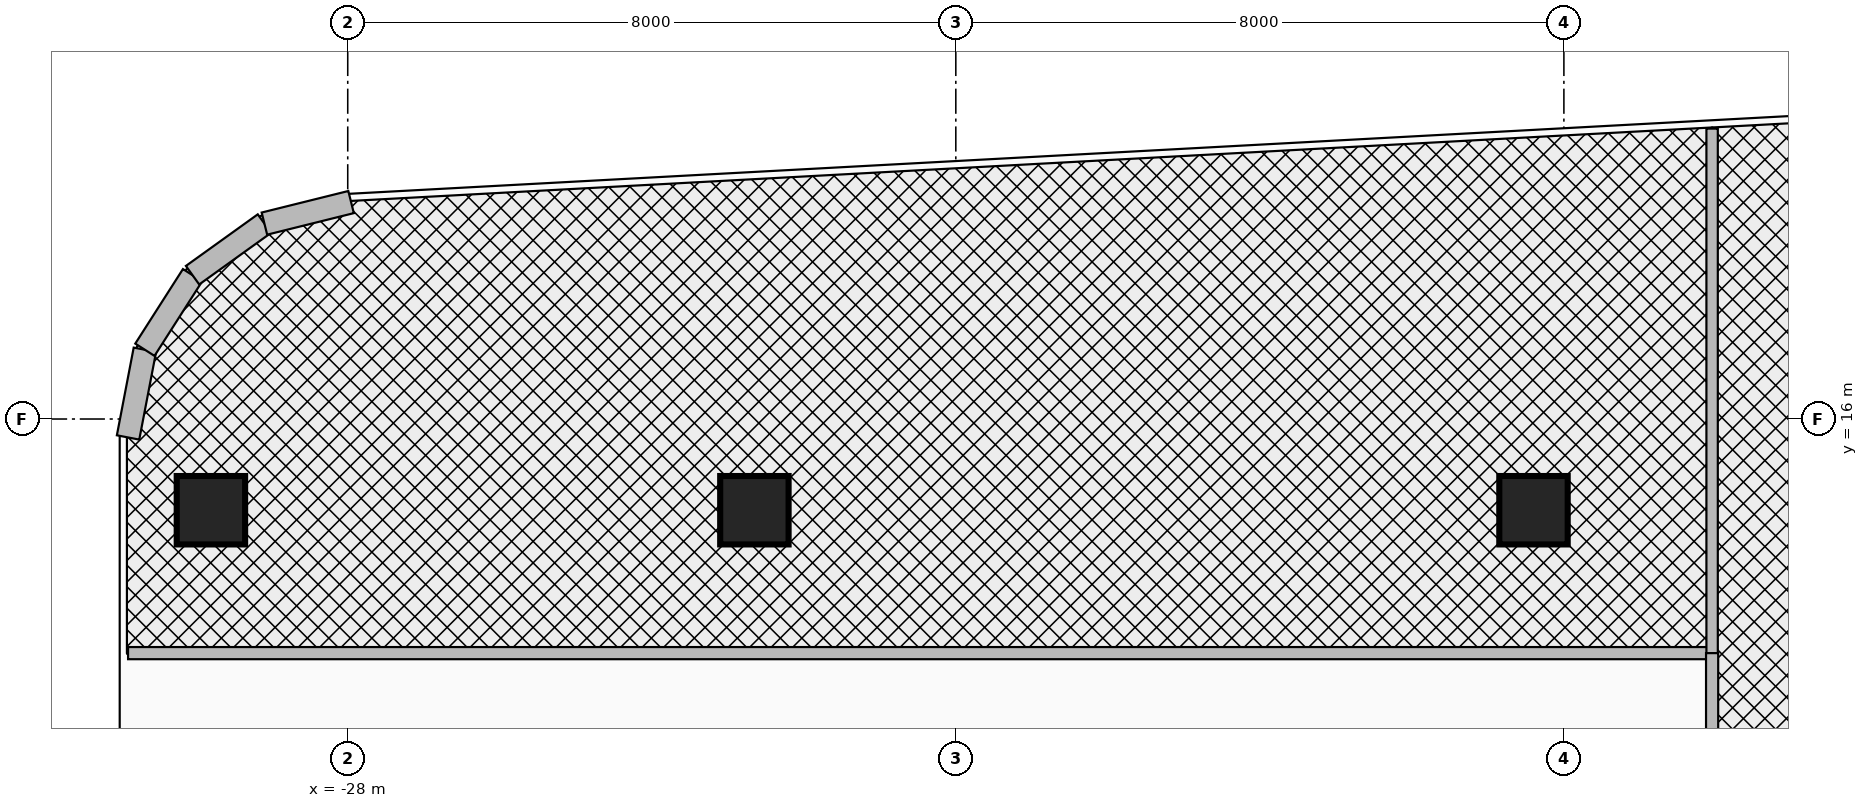
"""IFC4 building model, lengths in metres.
Left out: names, types, materials, properties, quantities, classifications, styles, units other than length and angle.
Written with IfcOpenShell. Run it as: python <this file> out.ifc"""

import sys

from ifc_helpers import new_model, si_unit, direction, frame, frame_2d, origin, origin_2d, place, context, subcontext, project, spatial, rectangle, extrude, source, transform, mapped, element, fill, save


model = new_model("IFC4")
c1 = context("Model", 3, precision=1e-05, world=origin(), true_north=direction((0.0, 1.0)))
c2 = subcontext(c1, "Body", "Model", "MODEL_VIEW")
j1 = project(units=[si_unit("LENGTHUNIT", "METRE"), si_unit("PLANEANGLEUNIT", "RADIAN")], contexts=[c1])
p1 = place(None, origin())
s1 = spatial("IfcSite", under=j1, at=p1, CompositionType="ELEMENT")
p2 = place(p1, origin())
s2 = spatial("IfcBuilding", under=s1, at=p2, CompositionType="ELEMENT")
p3 = place(p2, frame((0.0, 0.0, 201.0)))
s3 = spatial("IfcBuildingStorey", under=s2, at=p3, CompositionType="ELEMENT", Elevation=201.0)
m1 = source(origin(), c2, "Body", "SweptSolid", [
    extrude(rectangle(XDim=0.9, YDim=0.9, at=origin_2d()), origin(), (0.0, 0.0, 1.0), 4.5),
])
for number, where, z_axis, x_axis in (
    (1, (-29.8, 14.8, 0.0), (0.0, 0.0, 1.0), (1.0, 0.0, 0.0)),
    (2, (-22.65, 14.8, 0.0), (0.0, 0.0, 1.0), (1.0, 0.0, 0.0)),
    (3, (-12.4, 14.8, 0.0), (0.0, 0.0, 1.0), (1.0, 0.0, 0.0)),
):
    element("IfcColumn", number, at=place(p3, frame(where, z_axis=z_axis, x_axis=x_axis)), inside=s3, PredefinedType="COLUMN", context=c2, shape_type="MappedRepresentation", body=[
        mapped(m1, transform((0.0, 0.0, 0.0), x_axis=(1.0, 0.0, 0.0), y_axis=(0.0, 1.0, 0.0), z_axis=(0.0, 0.0, 1.0), scale=1.0)),
    ])
p4 = place(p3, frame((-30.89, 15.758, 0.0), z_axis=(0.0, 0.0, 1.0), x_axis=(0.18831542659, 0.982108598938, 0.0)))
e4 = element("IfcWall", 4, at=p4, inside=s3, PredefinedType="SOLIDWALL", context=c2, shape_type="SweptSolid", body=[
    extrude(rectangle(XDim=1.175, YDim=0.3, at=frame_2d((0.587, 0.0))), origin(), (0.0, 0.0, 1.0), 4.26),
])
p5 = place(p3, frame((-30.669, 16.911, 0.0), z_axis=(0.0, 0.0, 1.0), x_axis=(0.538678781902, 0.84251122837, 0.0)))
e5 = element("IfcWall", 5, at=p5, inside=s3, PredefinedType="SOLIDWALL", context=c2, shape_type="SweptSolid", body=[
    extrude(rectangle(XDim=1.164, YDim=0.3, at=frame_2d((0.582, 0.0))), origin(), (0.0, 0.0, 1.0), 4.26),
])
p6 = place(p3, frame((-30.042, 17.892, 0.0), z_axis=(0.0, 0.0, 1.0), x_axis=(0.812313539683, 0.583220981487, 0.0)))
e6 = element("IfcWall", 6, at=p6, inside=s3, PredefinedType="SOLIDWALL", context=c2, shape_type="SweptSolid", body=[
    extrude(rectangle(XDim=1.164, YDim=0.3, at=frame_2d((0.582, 0.0))), origin(), (0.0, 0.0, 1.0), 4.26),
])
p7 = place(p3, frame((-29.096, 18.571, 0.0), z_axis=(0.0, 0.0, 1.0), x_axis=(0.97050812798, 0.241068400098, 0.0)))
e7 = element("IfcWall", 7, at=p7, inside=s3, PredefinedType="SOLIDWALL", context=c2, shape_type="SweptSolid", body=[
    extrude(rectangle(XDim=1.175, YDim=0.3, at=frame_2d((0.587, 0.0))), origin(), (0.0, 0.0, 1.0), 4.26),
])
p8 = place(p3, frame((-30.89, 12.92, 0.0), z_axis=(0.0, 0.0, 1.0), x_axis=(1.0, 0.0, 0.0)))
e8 = element("IfcWall", 8, at=p8, inside=s3, PredefinedType="PARTITIONING", context=c2, shape_type="SweptSolid", body=[
    extrude(rectangle(XDim=20.84, YDim=0.16, at=frame_2d((10.42, 0.0))), origin(), (0.0, 0.0, 1.0), 3.634),
])
p9 = place(p8, frame((6.5, 0.0, 0.0)))
e9 = element("IfcOpeningElement", 9, at=p9, cuts=e8, PredefinedType="OPENING", context=c2, shape_type="SweptSolid", body=[
    extrude(rectangle(XDim=1.8, YDim=2.15, at=frame_2d((0.9, 1.075))), frame((0.0, 0.095, 0.0), z_axis=(0.0, -1.0, 0.0), x_axis=(1.0, 0.0, 0.0)), (0.0, 0.0, 1.0), 0.19),
])
p10 = place(p3, frame((-10.05, 12.92, 0.0), z_axis=(0.0, 0.0, 1.0), x_axis=(0.0, 1.0, 0.0)))
e10 = element("IfcWall", 10, at=p10, inside=s3, PredefinedType="PARTITIONING", context=c2, shape_type="SweptSolid", body=[
    extrude(rectangle(XDim=6.901, YDim=0.15, at=frame_2d((3.45, 0.0))), origin(), (0.0, 0.0, 1.0), 3.544),
])
p11 = place(p3, frame((-10.05, 3.4, 0.0), z_axis=(0.0, 0.0, 1.0), x_axis=(0.0, 1.0, 0.0)))
e11 = element("IfcWall", 11, at=p11, inside=s3, PredefinedType="PARTITIONING", context=c2, shape_type="SweptSolid", body=[
    extrude(rectangle(XDim=9.52, YDim=0.16, at=frame_2d((4.76, 0.0))), origin(), (0.0, 0.0, 1.0), 3.544),
])
p12 = place(p11, frame((1.4, 0.0, 0.0)))
e12 = element("IfcOpeningElement", 12, at=p12, cuts=e11, PredefinedType="OPENING", context=c2, shape_type="SweptSolid", body=[
    extrude(rectangle(XDim=1.8, YDim=2.15, at=frame_2d((0.9, 1.075))), frame((0.0, 0.095, 0.0), z_axis=(0.0, -1.0, 0.0), x_axis=(1.0, 0.0, 0.0)), (0.0, 0.0, 1.0), 0.19),
])
p13 = place(p9, frame((1.8, 0.0, 0.0), z_axis=(0.0, 0.0, 1.0), x_axis=(-1.0, 0.0, 0.0)))
e13 = element("IfcDoor", 13, at=p13, inside=s3, OperationType="DOUBLE_DOOR_SINGLE_SWING", PredefinedType="DOOR", context=c2, shape_type="SweptSolid", body=[
    extrude(rectangle(XDim=1.8, YDim=2.15, at=frame_2d((0.9, 1.075))), frame((0.0, 0.025, 0.0), z_axis=(0.0, -1.0, 0.0), x_axis=(1.0, 0.0, 0.0)), (0.0, 0.0, 1.0), 0.05),
])
fill(e9, e13)
save(model, sys.argv[1])
